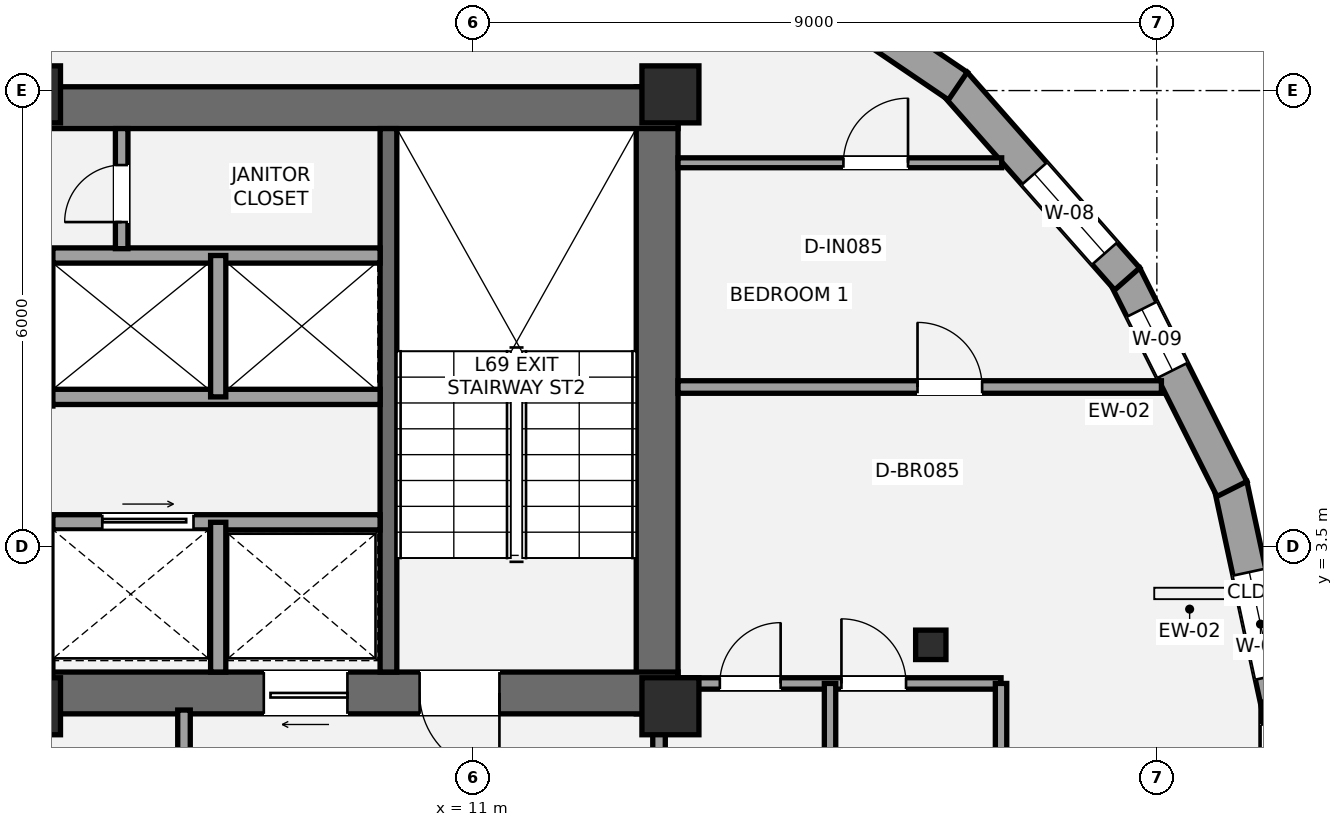
"""IFC4 building model, lengths in metres.
Left out: names, types, materials, properties, quantities, classifications, styles, units other than length and angle.
Written with IfcOpenShell. Run it as: python <this file> out.ifc"""

import sys

from ifc_helpers import new_model, si_unit, direction, frame, frame_2d, origin, origin_2d, place, context, subcontext, project, spatial, rectangle, i_section, extrude, element, fill, save


model = new_model("IFC4")
c1 = context("Model", 3, precision=1e-05, world=origin(), true_north=direction((0.0, 1.0)))
c2 = subcontext(c1, "Body", "Model", "MODEL_VIEW")
j1 = project(units=[si_unit("LENGTHUNIT", "METRE"), si_unit("PLANEANGLEUNIT", "RADIAN")], contexts=[c1])
p1 = place(None, origin())
s1 = spatial("IfcSite", under=j1, at=p1, CompositionType="ELEMENT")
p2 = place(p1, origin())
s2 = spatial("IfcBuilding", under=s1, at=p2, CompositionType="ELEMENT")
p3 = place(p2, frame((0.0, 0.0, 244.65)))
s3 = spatial("IfcBuildingStorey", under=s2, at=p3, CompositionType="ELEMENT", Elevation=244.65)
p4 = place(p3, frame((13.425, 1.3, 0.0), z_axis=(0.0, 0.0, 1.0), x_axis=(0.0, 1.0, 0.0)))
e1 = element("IfcWall", 1, at=p4, inside=s3, PredefinedType="SHEAR", context=c2, shape_type="SweptSolid", body=[
    extrude(rectangle(XDim=8.25, YDim=0.55, at=frame_2d((4.125, 0.0))), origin(), (0.0, 0.0, 1.0), 3.15),
])
p5 = place(p3, frame((4.525, 9.275, 0.0), z_axis=(0.0, 0.0, 1.0), x_axis=(1.0, 0.0, 0.0)))
e2 = element("IfcWall", 2, at=p5, inside=s3, PredefinedType="SHEAR", context=c2, shape_type="SweptSolid", body=[
    extrude(rectangle(XDim=9.175, YDim=0.55, at=frame_2d((4.587, 0.0))), origin(), (0.0, 0.0, 1.0), 3.15),
])
p6 = place(p3, frame((13.7, 1.575, 0.0), z_axis=(0.0, 0.0, 1.0), x_axis=(-1.0, 0.0, 0.0)))
e3 = element("IfcWall", 3, at=p6, inside=s3, PredefinedType="SHEAR", context=c2, shape_type="SweptSolid", body=[
    extrude(rectangle(XDim=8.775, YDim=0.55, at=frame_2d((4.387, 0.0))), origin(), (0.0, 0.0, 1.0), 3.15),
])
p7 = place(p6, frame((2.35, 0.0, 0.0)))
e4 = element("IfcOpeningElement", 4, at=p7, cuts=e3, PredefinedType="OPENING", context=c2, shape_type="SweptSolid", body=[
    extrude(rectangle(XDim=1.05, YDim=2.15, at=frame_2d((0.525, 1.075))), frame((0.0, 0.285, 0.0), z_axis=(0.0, -1.0, 0.0), x_axis=(1.0, 0.0, 0.0)), (0.0, 0.0, 1.0), 0.57),
])
p8 = place(p6, frame((4.35, 0.0, 0.0)))
e5 = element("IfcOpeningElement", 5, at=p8, cuts=e3, PredefinedType="OPENING", context=c2, shape_type="SweptSolid", body=[
    extrude(rectangle(XDim=1.1, YDim=2.2, at=frame_2d((0.55, 1.1))), frame((0.0, 0.285, 0.0), z_axis=(0.0, -1.0, 0.0), x_axis=(1.0, 0.0, 0.0)), (0.0, 0.0, 1.0), 0.57),
])
p9 = place(p3, frame((5.2, 1.3, 0.0), z_axis=(0.0, 0.0, 1.0), x_axis=(0.0, 1.0, 0.0)))
e6 = element("IfcWall", 6, at=p9, inside=s3, PredefinedType="SHEAR", context=c2, shape_type="SweptSolid", body=[
    extrude(rectangle(XDim=2.5, YDim=0.55, at=frame_2d((1.25, 0.0))), origin(), (0.0, 0.0, 1.0), 3.15),
])
p10 = place(p3, frame((5.2, 5.35, 0.0), z_axis=(0.0, 0.0, 1.0), x_axis=(0.0, 1.0, 0.0)))
e7 = element("IfcWall", 7, at=p10, inside=s3, PredefinedType="SHEAR", context=c2, shape_type="SweptSolid", body=[
    extrude(rectangle(XDim=2.0, YDim=0.55, at=frame_2d((1.0, 0.0))), origin(), (0.0, 0.0, 1.0), 3.15),
])
p11 = place(p3, frame((9.89, 1.85, 0.0), z_axis=(0.0, 0.0, 1.0), x_axis=(0.0, 1.0, 0.0)))
e8 = element("IfcWall", 8, at=p11, inside=s3, PredefinedType="SHEAR", context=c2, shape_type="SweptSolid", body=[
    extrude(rectangle(XDim=7.15, YDim=0.22, at=frame_2d((3.575, 0.0))), origin(), (0.0, 0.0, 1.0), 3.15),
])
for number, where, z_axis, x_axis in (
    (9, (5.2, 1.4, 0.0), (0.0, 0.0, 1.0), (1.0, 0.0, 0.0)),
    (10, (5.2, 9.45, 0.0), (0.0, 0.0, 1.0), (1.0, 0.0, 0.0)),
    (11, (13.6, 1.4, 0.0), (0.0, 0.0, 1.0), (1.0, 0.0, 0.0)),
    (12, (13.6, 9.45, 0.0), (0.0, 0.0, 1.0), (1.0, 0.0, 0.0)),
):
    element("IfcColumn", number, at=place(p3, frame(where, z_axis=z_axis, x_axis=x_axis)), inside=s3, PredefinedType="PILASTER", context=c2, shape_type="SweptSolid", body=[
        extrude(rectangle(XDim=0.75, YDim=0.75, at=origin_2d()), origin(), (0.0, 0.0, 1.0), 3.15),
    ])
p12 = place(p3, frame((17.026, 2.208, 0.0), z_axis=(0.0, 0.0, 1.0), x_axis=(1.0, 0.0, 0.0)))
e13 = element("IfcColumn", 13, at=p12, inside=s3, PredefinedType="COLUMN", context=c2, shape_type="SweptSolid", body=[
    extrude(i_section(OverallWidth=0.399, OverallDepth=0.387, WebThickness=0.021, FlangeThickness=0.033, at=origin_2d()), origin(), (0.0, 0.0, 1.0), 3.15),
])
p13 = place(p3, frame((20.969, 4.311, 0.0), z_axis=(0.0, 0.0, 1.0), x_axis=(0.210540350534, -0.977585168053, 0.0)))
e14 = element("IfcWall", 14, at=p13, inside=s3, PredefinedType="STANDARD", context=c2, shape_type="SweptSolid", body=[
    extrude(rectangle(XDim=2.967, YDim=0.44, at=frame_2d((1.484, 0.0))), origin(), (0.0, 0.0, 1.0), 2.336),
])
p14 = place(p13, frame((1.173, 0.0, 0.55)))
e15 = element("IfcOpeningElement", 15, at=p14, cuts=e14, PredefinedType="OPENING", context=c2, shape_type="SweptSolid", body=[
    extrude(rectangle(XDim=1.4, YDim=1.55, at=frame_2d((0.7, 0.775))), frame((0.0, 0.23, 0.0), z_axis=(0.0, -1.0, 0.0), x_axis=(1.0, 0.0, 0.0)), (0.0, 0.0, 1.0), 0.46),
])
p15 = place(p3, frame((19.578, 7.069, 0.0), z_axis=(0.0, 0.0, 1.0), x_axis=(0.448424724145, -0.893820601002, 0.0)))
e16 = element("IfcWall", 16, at=p15, inside=s3, PredefinedType="STANDARD", context=c2, shape_type="SweptSolid", body=[
    extrude(rectangle(XDim=3.144, YDim=0.44, at=frame_2d((1.572, 0.0))), origin(), (0.0, 0.0, 1.0), 2.336),
])
p16 = place(p15, frame((0.499, 0.0, 0.58)))
e17 = element("IfcOpeningElement", 17, at=p16, cuts=e16, PredefinedType="OPENING", context=c2, shape_type="SweptSolid", body=[
    extrude(rectangle(XDim=0.9, YDim=1.35, at=frame_2d((0.45, 0.675))), frame((0.0, 0.23, 0.0), z_axis=(0.0, -1.0, 0.0), x_axis=(1.0, 0.0, 0.0)), (0.0, 0.0, 1.0), 0.46),
])
p17 = place(p3, frame((17.34, 9.596, 0.0), z_axis=(0.0, 0.0, 1.0), x_axis=(0.66136043846, -0.750068243855, 0.0)))
e18 = element("IfcWall", 18, at=p17, inside=s3, PredefinedType="STANDARD", context=c2, shape_type="SweptSolid", body=[
    extrude(rectangle(XDim=3.432, YDim=0.44, at=frame_2d((1.716, 0.0))), origin(), (0.0, 0.0, 1.0), 2.336),
])
p18 = place(p17, frame((1.585, 0.0, 0.58)))
e19 = element("IfcOpeningElement", 19, at=p18, cuts=e18, PredefinedType="OPENING", context=c2, shape_type="SweptSolid", body=[
    extrude(rectangle(XDim=1.4, YDim=1.55, at=frame_2d((0.7, 0.775))), frame((0.0, 0.23, 0.0), z_axis=(0.0, -1.0, 0.0), x_axis=(1.0, 0.0, 0.0)), (0.0, 0.0, 1.0), 0.46),
])
p19 = place(p3, frame((14.242, 11.688, 0.0), z_axis=(0.0, 0.0, 1.0), x_axis=(0.827637036896, -0.561263694851, 0.0)))
e20 = element("IfcWall", 20, at=p19, inside=s3, PredefinedType="STANDARD", context=c2, shape_type="SweptSolid", body=[
    extrude(rectangle(XDim=3.793, YDim=0.44, at=frame_2d((1.896, 0.0))), origin(), (0.0, 0.0, 1.0), 2.336),
])
p20 = place(p19, frame((0.648, 0.0, 0.55)))
e21 = element("IfcOpeningElement", 21, at=p20, cuts=e20, PredefinedType="OPENING", context=c2, shape_type="SweptSolid", body=[
    extrude(rectangle(XDim=1.75, YDim=1.55, at=frame_2d((0.875, 0.775))), frame((0.0, 0.23, 0.0), z_axis=(0.0, -1.0, 0.0), x_axis=(1.0, 0.0, 0.0)), (0.0, 0.0, 1.0), 0.46),
])
p21 = place(p3, frame((21.589, 1.457, 0.0), z_axis=(0.0, 0.0, 1.0), x_axis=(0.0, -1.0, 0.0)))
e22 = element("IfcWall", 22, at=p21, inside=s3, PredefinedType="STANDARD", context=c2, shape_type="SweptSolid", body=[
    extrude(rectangle(XDim=2.913, YDim=0.44, at=frame_2d((1.457, 0.0))), origin(), (0.0, 0.0, 1.0), 2.34),
])
p22 = place(p21, frame((0.297, 0.0, 0.58)))
e23 = element("IfcOpeningElement", 23, at=p22, cuts=e22, PredefinedType="OPENING", context=c2, shape_type="SweptSolid", body=[
    extrude(rectangle(XDim=1.4, YDim=1.55, at=frame_2d((0.7, 0.775))), frame((0.0, 0.23, 0.0), z_axis=(0.0, -1.0, 0.0), x_axis=(1.0, 0.0, 0.0)), (0.0, 0.0, 1.0), 0.46),
])
p23 = place(p3, frame((7.2, -2.15, 0.0), z_axis=(0.0, 0.0, 1.0), x_axis=(0.0, 1.0, 0.0)))
e24 = element("IfcWall", 24, at=p23, inside=s3, PredefinedType="PARTITIONING", context=c2, shape_type="SweptSolid", body=[
    extrude(rectangle(XDim=3.5, YDim=0.165, at=frame_2d((1.75, 0.0))), origin(), (0.0, 0.0, 1.0), 2.423),
])
p24 = place(p3, frame((13.45, -2.15, 0.0), z_axis=(0.0, 0.0, 1.0), x_axis=(0.0, 1.0, 0.0)))
e25 = element("IfcWall", 25, at=p24, inside=s3, PredefinedType="PARTITIONING", context=c2, shape_type="SweptSolid", body=[
    extrude(rectangle(XDim=3.5, YDim=0.165, at=frame_2d((1.75, 0.0))), origin(), (0.0, 0.0, 1.0), 2.423),
])
p25 = place(p24, frame((0.67, 0.0, 0.0)))
e26 = element("IfcOpeningElement", 26, at=p25, cuts=e25, PredefinedType="OPENING", context=c2, shape_type="SweptSolid", body=[
    extrude(rectangle(XDim=1.05, YDim=2.15, at=frame_2d((0.525, 1.075))), frame((0.0, 0.093, 0.0), z_axis=(0.0, -1.0, 0.0), x_axis=(1.0, 0.0, 0.0)), (0.0, 0.0, 1.0), 0.185),
])
p26 = place(p3, frame((5.475, 3.82, 0.0), z_axis=(0.0, 0.0, 1.0), x_axis=(1.0, 0.0, 0.0)))
e27 = element("IfcWall", 27, at=p26, inside=s3, PredefinedType="SOLIDWALL", context=c2, shape_type="SweptSolid", body=[
    extrude(rectangle(XDim=4.305, YDim=0.2, at=frame_2d((2.152, 0.0))), origin(), (0.0, 0.0, 1.0), 2.97),
])
p27 = place(p26, frame((0.65, 0.0, 0.0)))
e28 = element("IfcOpeningElement", 28, at=p27, cuts=e27, PredefinedType="OPENING", context=c2, shape_type="SweptSolid", body=[
    extrude(rectangle(XDim=1.2, YDim=2.2, at=frame_2d((0.6, 1.1))), frame((0.0, 0.11, 0.0), z_axis=(0.0, -1.0, 0.0), x_axis=(1.0, 0.0, 0.0)), (0.0, 0.0, 1.0), 0.22),
])
p28 = place(p3, frame((7.65, 1.85, 0.0), z_axis=(0.0, 0.0, 1.0), x_axis=(0.0, 1.0, 0.0)))
e29 = element("IfcWall", 29, at=p28, inside=s3, PredefinedType="SOLIDWALL", context=c2, shape_type="SweptSolid", body=[
    extrude(rectangle(XDim=1.97, YDim=0.2, at=frame_2d((0.985, 0.0))), origin(), (0.0, 0.0, 1.0), 2.97),
])
for number, where, z_axis, x_axis in (
    (30, (5.475, 5.47, 0.0), (0.0, 0.0, 1.0), (1.0, 0.0, 0.0)),
    (31, (5.475, 7.33, 0.0), (0.0, 0.0, 1.0), (1.0, 0.0, 0.0)),
):
    element("IfcWall", number, at=place(p3, frame(where, z_axis=z_axis, x_axis=x_axis)), inside=s3, PredefinedType="SOLIDWALL", context=c2, shape_type="SweptSolid", body=[
        extrude(rectangle(XDim=4.305, YDim=0.2, at=frame_2d((2.152, 0.0))), origin(), (0.0, 0.0, 1.0), 2.97),
    ])
p29 = place(p3, frame((7.65, 5.47, 0.0), z_axis=(0.0, 0.0, 1.0), x_axis=(0.0, 1.0, 0.0)))
e32 = element("IfcWall", 32, at=p29, inside=s3, PredefinedType="SOLIDWALL", context=c2, shape_type="SweptSolid", body=[
    extrude(rectangle(XDim=1.86, YDim=0.2, at=frame_2d((0.93, 0.0))), origin(), (0.0, 0.0, 1.0), 2.97),
])
p30 = place(p3, frame((6.38, 7.42, 0.0), z_axis=(0.0, 0.0, 1.0), x_axis=(0.0, 1.0, 0.0)))
e33 = element("IfcWall", 33, at=p30, inside=s3, PredefinedType="PARTITIONING", context=c2, shape_type="SweptSolid", body=[
    extrude(rectangle(XDim=1.58, YDim=0.165, at=frame_2d((0.79, 0.0))), origin(), (0.0, 0.0, 1.0), 2.97),
])
p31 = place(p30, frame((0.35, 0.0, 0.0)))
e34 = element("IfcOpeningElement", 34, at=p31, cuts=e33, PredefinedType="OPENING", context=c2, shape_type="SweptSolid", body=[
    extrude(rectangle(XDim=0.75, YDim=2.1, at=frame_2d((0.375, 1.05))), frame((0.0, 0.093, 0.0), z_axis=(0.0, -1.0, 0.0), x_axis=(1.0, 0.0, 0.0)), (0.0, 0.0, 1.0), 0.185),
])
p32 = place(p3, frame((13.7, 5.6, 0.0), z_axis=(0.0, 0.0, 1.0), x_axis=(1.0, 0.0, 0.0)))
e35 = element("IfcWall", 35, at=p32, inside=s3, PredefinedType="PARTITIONING", context=c2, shape_type="SweptSolid", body=[
    extrude(rectangle(XDim=6.36, YDim=0.165, at=frame_2d((3.18, 0.0))), origin(), (0.0, 0.0, 1.0), 2.423),
])
p33 = place(p32, frame((3.151, 0.0, 0.0)))
e36 = element("IfcOpeningElement", 36, at=p33, cuts=e35, PredefinedType="OPENING", context=c2, shape_type="SweptSolid", body=[
    extrude(rectangle(XDim=0.85, YDim=2.1, at=frame_2d((0.425, 1.05))), frame((0.0, 0.093, 0.0), z_axis=(0.0, -1.0, 0.0), x_axis=(1.0, 0.0, 0.0)), (0.0, 0.0, 1.0), 0.185),
])
p34 = place(p3, frame((13.7, 1.7, 0.0), z_axis=(0.0, 0.0, 1.0), x_axis=(1.0, 0.0, 0.0)))
e37 = element("IfcWall", 37, at=p34, inside=s3, PredefinedType="PLUMBINGWALL", context=c2, shape_type="SweptSolid", body=[
    extrude(rectangle(XDim=4.25, YDim=0.15, at=frame_2d((2.125, 0.0))), origin(), (0.0, 0.0, 1.0), 2.423),
])
p35 = place(p34, frame((0.55, 0.0, 0.0)))
e38 = element("IfcOpeningElement", 38, at=p35, cuts=e37, PredefinedType="OPENING", context=c2, shape_type="SweptSolid", body=[
    extrude(rectangle(XDim=0.8, YDim=2.1, at=frame_2d((0.4, 1.05))), frame((0.0, 0.085, 0.0), z_axis=(0.0, -1.0, 0.0), x_axis=(1.0, 0.0, 0.0)), (0.0, 0.0, 1.0), 0.17),
])
p36 = place(p34, frame((2.15, 0.0, 0.0)))
e39 = element("IfcOpeningElement", 39, at=p36, cuts=e37, PredefinedType="OPENING", context=c2, shape_type="SweptSolid", body=[
    extrude(rectangle(XDim=0.85, YDim=2.1, at=frame_2d((0.425, 1.05))), frame((0.0, 0.085, 0.0), z_axis=(0.0, -1.0, 0.0), x_axis=(1.0, 0.0, 0.0)), (0.0, 0.0, 1.0), 0.17),
])
for number, where, z_axis, x_axis in (
    (40, (15.7, -0.35, 0.0), (0.0, 0.0, 1.0), (0.0, 1.0, 0.0)),
    (41, (17.95, -0.35, 0.0), (0.0, 0.0, 1.0), (0.0, 1.0, 0.0)),
):
    element("IfcWall", number, at=place(p3, frame(where, z_axis=z_axis, x_axis=x_axis)), inside=s3, PredefinedType="PLUMBINGWALL", context=c2, shape_type="SweptSolid", body=[
        extrude(rectangle(XDim=2.05, YDim=0.15, at=frame_2d((1.025, 0.0))), origin(), (0.0, 0.0, 1.0), 2.97),
    ])
p37 = place(p3, frame((13.7, 8.55, 0.0), z_axis=(0.0, 0.0, 1.0), x_axis=(1.0, 0.0, 0.0)))
e42 = element("IfcWall", 42, at=p37, inside=s3, PredefinedType="PARTITIONING", context=c2, shape_type="SweptSolid", body=[
    extrude(rectangle(XDim=4.258, YDim=0.13, at=frame_2d((2.129, 0.0))), origin(), (0.0, 0.0, 1.0), 2.423),
])
p38 = place(p37, frame((2.176, 0.0, 0.0)))
e43 = element("IfcOpeningElement", 43, at=p38, cuts=e42, PredefinedType="OPENING", context=c2, shape_type="SweptSolid", body=[
    extrude(rectangle(XDim=0.85, YDim=2.1, at=frame_2d((0.425, 1.05))), frame((0.0, 0.075, 0.0), z_axis=(0.0, -1.0, 0.0), x_axis=(1.0, 0.0, 0.0)), (0.0, 0.0, 1.0), 0.15),
])
p39 = place(p14, origin())
e44 = element("IfcWindow", 44, at=p39, inside=s3, PartitioningType="SINGLE_PANEL", PredefinedType="WINDOW", context=c2, shape_type="SweptSolid", body=[
    extrude(rectangle(XDim=1.4, YDim=1.55, at=frame_2d((0.7, 0.775))), frame((0.0, -0.01, 0.0), z_axis=(0.0, -1.0, 0.0), x_axis=(1.0, 0.0, 0.0)), (0.0, 0.0, 1.0), 0.06),
])
fill(e15, e44)
p40 = place(p16, origin())
e45 = element("IfcWindow", 45, at=p40, inside=s3, PartitioningType="SINGLE_PANEL", PredefinedType="WINDOW", context=c2, shape_type="SweptSolid", body=[
    extrude(rectangle(XDim=0.9, YDim=1.35, at=frame_2d((0.45, 0.675))), frame((0.0, -0.01, 0.0), z_axis=(0.0, -1.0, 0.0), x_axis=(1.0, 0.0, 0.0)), (0.0, 0.0, 1.0), 0.06),
])
fill(e17, e45)
p41 = place(p18, origin())
e46 = element("IfcWindow", 46, at=p41, inside=s3, PartitioningType="SINGLE_PANEL", PredefinedType="WINDOW", context=c2, shape_type="SweptSolid", body=[
    extrude(rectangle(XDim=1.4, YDim=1.55, at=frame_2d((0.7, 0.775))), frame((0.0, -0.01, 0.0), z_axis=(0.0, -1.0, 0.0), x_axis=(1.0, 0.0, 0.0)), (0.0, 0.0, 1.0), 0.06),
])
fill(e19, e46)
p42 = place(p7, origin())
e47 = element("IfcDoor", 47, at=p42, inside=s3, OperationType="SINGLE_SWING_LEFT", PredefinedType="DOOR", context=c2, shape_type="SweptSolid", body=[
    extrude(rectangle(XDim=1.05, YDim=2.15, at=frame_2d((0.525, 1.075))), frame((0.0, 0.025, 0.0), z_axis=(0.0, -1.0, 0.0), x_axis=(1.0, 0.0, 0.0)), (0.0, 0.0, 1.0), 0.05),
])
fill(e4, e47)
p43 = place(p8, origin())
e48 = element("IfcDoor", 48, at=p43, inside=s3, OperationType="SLIDING_TO_LEFT", PredefinedType="DOOR", context=c2, shape_type="SweptSolid", body=[
    extrude(rectangle(XDim=1.1, YDim=2.2, at=frame_2d((0.55, 1.1))), frame((0.0, 0.025, 0.0), z_axis=(0.0, -1.0, 0.0), x_axis=(1.0, 0.0, 0.0)), (0.0, 0.0, 1.0), 0.05),
])
fill(e5, e48)
p44 = place(p27, origin())
e49 = element("IfcDoor", 49, at=p44, inside=s3, OperationType="SLIDING_TO_RIGHT", PredefinedType="DOOR", context=c2, shape_type="SweptSolid", body=[
    extrude(rectangle(XDim=1.2, YDim=2.2, at=frame_2d((0.6, 1.1))), frame((0.0, 0.025, 0.0), z_axis=(0.0, -1.0, 0.0), x_axis=(1.0, 0.0, 0.0)), (0.0, 0.0, 1.0), 0.05),
])
fill(e28, e49)
p45 = place(p31, origin())
e50 = element("IfcDoor", 50, at=p45, inside=s3, OperationType="SINGLE_SWING_LEFT", PredefinedType="DOOR", context=c2, shape_type="SweptSolid", body=[
    extrude(rectangle(XDim=0.75, YDim=2.1, at=frame_2d((0.375, 1.05))), frame((0.0, 0.025, 0.0), z_axis=(0.0, -1.0, 0.0), x_axis=(1.0, 0.0, 0.0)), (0.0, 0.0, 1.0), 0.05),
])
fill(e34, e50)
p46 = place(p35, origin())
e51 = element("IfcDoor", 51, at=p46, inside=s3, OperationType="SINGLE_SWING_RIGHT", PredefinedType="DOOR", context=c2, shape_type="SweptSolid", body=[
    extrude(rectangle(XDim=0.8, YDim=2.1, at=frame_2d((0.4, 1.05))), frame((0.0, 0.025, 0.0), z_axis=(0.0, -1.0, 0.0), x_axis=(1.0, 0.0, 0.0)), (0.0, 0.0, 1.0), 0.05),
])
fill(e38, e51)
p47 = place(p36, origin())
e52 = element("IfcDoor", 52, at=p47, inside=s3, OperationType="SINGLE_SWING_LEFT", PredefinedType="DOOR", context=c2, shape_type="SweptSolid", body=[
    extrude(rectangle(XDim=0.85, YDim=2.1, at=frame_2d((0.425, 1.05))), frame((0.0, 0.025, 0.0), z_axis=(0.0, -1.0, 0.0), x_axis=(1.0, 0.0, 0.0)), (0.0, 0.0, 1.0), 0.05),
])
fill(e39, e52)
p48 = place(p33, origin())
e53 = element("IfcDoor", 53, at=p48, inside=s3, OperationType="SINGLE_SWING_LEFT", PredefinedType="DOOR", context=c2, shape_type="SweptSolid", body=[
    extrude(rectangle(XDim=0.85, YDim=2.1, at=frame_2d((0.425, 1.05))), frame((0.0, 0.025, 0.0), z_axis=(0.0, -1.0, 0.0), x_axis=(1.0, 0.0, 0.0)), (0.0, 0.0, 1.0), 0.05),
])
fill(e36, e53)
p49 = place(p38, origin())
e54 = element("IfcDoor", 54, at=p49, inside=s3, OperationType="SINGLE_SWING_RIGHT", PredefinedType="DOOR", context=c2, shape_type="SweptSolid", body=[
    extrude(rectangle(XDim=0.85, YDim=2.1, at=frame_2d((0.425, 1.05))), frame((0.0, 0.025, 0.0), z_axis=(0.0, -1.0, 0.0), x_axis=(1.0, 0.0, 0.0)), (0.0, 0.0, 1.0), 0.05),
])
fill(e43, e54)
save(model, sys.argv[1])
